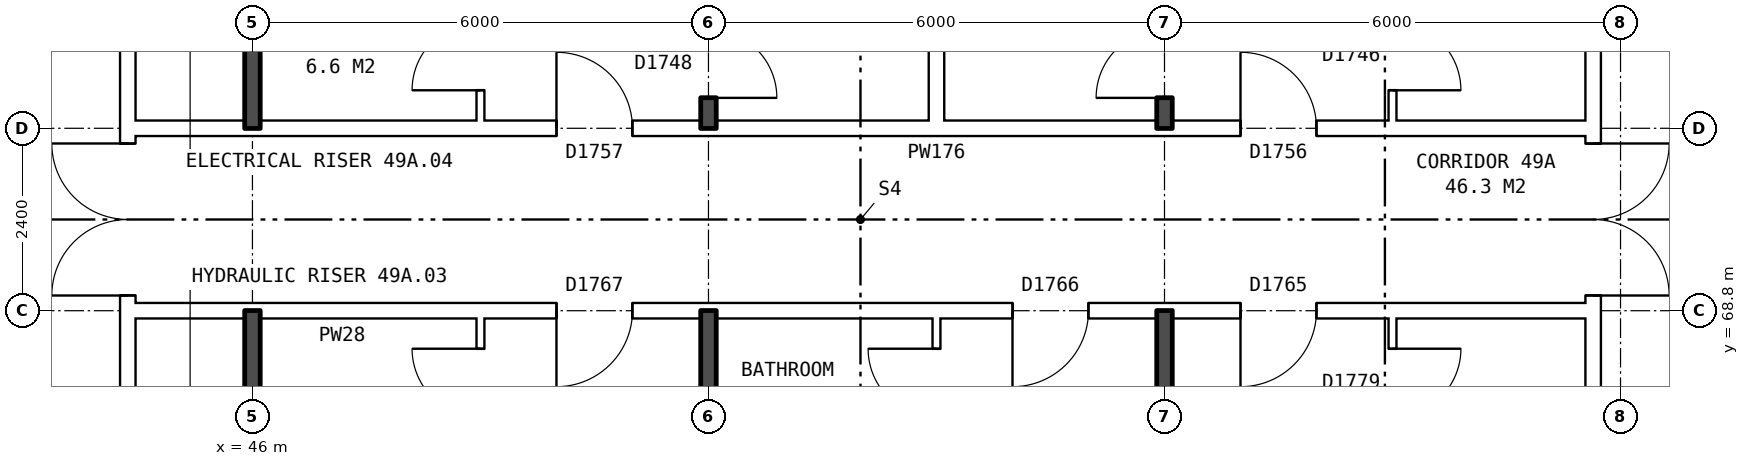
"""IFC4 building model, lengths in metres.
Left out: names, types, materials, properties, quantities, classifications, styles, units other than length and angle.
Written with IfcOpenShell. Run it as: python <this file> out.ifc"""

import sys

from ifc_helpers import new_model, si_unit, direction, frame, frame_2d, origin, place, context, subcontext, project, spatial, rectangle, extrude, element, fill, save


model = new_model("IFC4")
c1 = context("Model", 3, precision=1e-05, world=origin(), true_north=direction((0.0, 1.0)))
c2 = subcontext(c1, "Body", "Model", "MODEL_VIEW")
j1 = project(units=[si_unit("LENGTHUNIT", "METRE"), si_unit("PLANEANGLEUNIT", "RADIAN")], contexts=[c1])
p1 = place(None, origin())
s1 = spatial("IfcSite", under=j1, at=p1, CompositionType="ELEMENT")
p2 = place(p1, origin())
s2 = spatial("IfcBuilding", under=s1, at=p2, CompositionType="ELEMENT")
p3 = place(p2, frame((0.0, 0.0, 175.8)))
s3 = spatial("IfcBuildingStorey", under=s2, at=p3, CompositionType="ELEMENT", Elevation=175.8)
p4 = place(p3, frame((63.64, 63.9, 0.0), z_axis=(0.0, 0.0, 1.0), x_axis=(0.0, 1.0, 0.0)))
e1 = element("IfcWall", 1, at=p4, inside=s3, PredefinedType="PARTITIONING", context=c2, shape_type="SweptSolid", body=[
    extrude(rectangle(XDim=12.2, YDim=0.2, at=frame_2d((6.1, 0.0))), origin(), (0.0, 0.0, 1.0), 2.85),
])
p5 = place(p4, frame((5.1, 0.0, 0.0)))
e2 = element("IfcOpeningElement", 2, at=p5, cuts=e1, PredefinedType="OPENING", context=c2, shape_type="SweptSolid", body=[
    extrude(rectangle(XDim=2.0, YDim=2.1, at=frame_2d((1.0, 1.05))), frame((0.0, 0.11, 0.0), z_axis=(0.0, -1.0, 0.0), x_axis=(1.0, 0.0, 0.0)), (0.0, 0.0, 1.0), 0.22),
])
p6 = place(p3, frame((44.36, 63.9, 0.0), z_axis=(0.0, 0.0, 1.0), x_axis=(0.0, 1.0, 0.0)))
e3 = element("IfcWall", 3, at=p6, inside=s3, PredefinedType="PARTITIONING", context=c2, shape_type="SweptSolid", body=[
    extrude(rectangle(XDim=12.2, YDim=0.2, at=frame_2d((6.1, 0.0))), origin(), (0.0, 0.0, 1.0), 2.85),
])
p7 = place(p6, frame((5.1, 0.0, 0.0)))
e4 = element("IfcOpeningElement", 4, at=p7, cuts=e3, PredefinedType="OPENING", context=c2, shape_type="SweptSolid", body=[
    extrude(rectangle(XDim=2.0, YDim=2.1, at=frame_2d((1.0, 1.05))), frame((0.0, 0.11, 0.0), z_axis=(0.0, -1.0, 0.0), x_axis=(1.0, 0.0, 0.0)), (0.0, 0.0, 1.0), 0.22),
])
p8 = place(p3, frame((44.36, 68.8, 0.0), z_axis=(0.0, 0.0, 1.0), x_axis=(1.0, 0.0, 0.0)))
e5 = element("IfcWall", 5, at=p8, inside=s3, PredefinedType="PARTITIONING", context=c2, shape_type="SweptSolid", body=[
    extrude(rectangle(XDim=19.28, YDim=0.2, at=frame_2d((9.64, 0.0))), origin(), (0.0, 0.0, 1.0), 2.85),
])
p9 = place(p8, frame((14.64, 0.0, 0.0)))
e6 = element("IfcOpeningElement", 6, at=p9, cuts=e5, PredefinedType="OPENING", context=c2, shape_type="SweptSolid", body=[
    extrude(rectangle(XDim=1.0, YDim=2.1, at=frame_2d((0.5, 1.05))), frame((0.0, 0.11, 0.0), z_axis=(0.0, -1.0, 0.0), x_axis=(1.0, 0.0, 0.0)), (0.0, 0.0, 1.0), 0.22),
])
p10 = place(p8, frame((11.64, 0.0, 0.0)))
e7 = element("IfcOpeningElement", 7, at=p10, cuts=e5, PredefinedType="OPENING", context=c2, shape_type="SweptSolid", body=[
    extrude(rectangle(XDim=1.0, YDim=2.1, at=frame_2d((0.5, 1.05))), frame((0.0, 0.11, 0.0), z_axis=(0.0, -1.0, 0.0), x_axis=(1.0, 0.0, 0.0)), (0.0, 0.0, 1.0), 0.22),
])
p11 = place(p8, frame((5.64, 0.0, 0.0)))
e8 = element("IfcOpeningElement", 8, at=p11, cuts=e5, PredefinedType="OPENING", context=c2, shape_type="SweptSolid", body=[
    extrude(rectangle(XDim=1.0, YDim=2.1, at=frame_2d((0.5, 1.05))), frame((0.0, 0.11, 0.0), z_axis=(0.0, -1.0, 0.0), x_axis=(1.0, 0.0, 0.0)), (0.0, 0.0, 1.0), 0.22),
])
p12 = place(p3, frame((44.36, 71.2, 0.0), z_axis=(0.0, 0.0, 1.0), x_axis=(1.0, 0.0, 0.0)))
e9 = element("IfcWall", 9, at=p12, inside=s3, PredefinedType="PARTITIONING", context=c2, shape_type="SweptSolid", body=[
    extrude(rectangle(XDim=19.28, YDim=0.2, at=frame_2d((9.64, 0.0))), origin(), (0.0, 0.0, 1.0), 2.85),
])
p13 = place(p12, frame((14.64, 0.0, 0.0)))
e10 = element("IfcOpeningElement", 10, at=p13, cuts=e9, PredefinedType="OPENING", context=c2, shape_type="SweptSolid", body=[
    extrude(rectangle(XDim=1.0, YDim=2.1, at=frame_2d((0.5, 1.05))), frame((0.0, 0.11, 0.0), z_axis=(0.0, -1.0, 0.0), x_axis=(1.0, 0.0, 0.0)), (0.0, 0.0, 1.0), 0.22),
])
p14 = place(p12, frame((5.64, 0.0, 0.0)))
e11 = element("IfcOpeningElement", 11, at=p14, cuts=e9, PredefinedType="OPENING", context=c2, shape_type="SweptSolid", body=[
    extrude(rectangle(XDim=1.0, YDim=2.1, at=frame_2d((0.5, 1.05))), frame((0.0, 0.11, 0.0), z_axis=(0.0, -1.0, 0.0), x_axis=(1.0, 0.0, 0.0)), (0.0, 0.0, 1.0), 0.22),
])
for number, where, z_axis, x_axis in (
    (12, (46.0, 63.8, 0.0), (0.0, 0.0, 1.0), (0.0, 1.0, 0.0)),
    (13, (46.0, 71.2, 0.0), (0.0, 0.0, 1.0), (0.0, 1.0, 0.0)),
):
    element("IfcWall", number, at=place(p3, frame(where, z_axis=z_axis, x_axis=x_axis)), inside=s3, PredefinedType="SOLIDWALL", context=c2, shape_type="SweptSolid", body=[
        extrude(rectangle(XDim=5.0, YDim=0.2, at=frame_2d((2.5, 0.0))), origin(), (0.0, 0.0, 1.0), 2.85),
    ])
p15 = place(p3, frame((49.0, 54.36, 0.0), z_axis=(0.0, 0.0, 1.0), x_axis=(0.0, 1.0, 0.0)))
e14 = element("IfcWall", 14, at=p15, inside=s3, PredefinedType="PARTITIONING", context=c2, shape_type="SweptSolid", body=[
    extrude(rectangle(XDim=14.34, YDim=0.1, at=frame_2d((7.17, 0.0))), origin(), (0.0, 0.0, 1.0), 2.85),
])
p16 = place(p15, frame((6.7, 0.0, 0.0)))
e15 = element("IfcOpeningElement", 15, at=p16, cuts=e14, PredefinedType="OPENING", context=c2, shape_type="SweptSolid", body=[
    extrude(rectangle(XDim=0.9, YDim=2.1, at=frame_2d((0.45, 1.05))), frame((0.0, 0.06, 0.0), z_axis=(0.0, -1.0, 0.0), x_axis=(1.0, 0.0, 0.0)), (0.0, 0.0, 1.0), 0.12),
])
p17 = place(p15, frame((13.04, 0.0, 0.0)))
e16 = element("IfcOpeningElement", 16, at=p17, cuts=e14, PredefinedType="OPENING", context=c2, shape_type="SweptSolid", body=[
    extrude(rectangle(XDim=0.9, YDim=2.1, at=frame_2d((0.45, 1.05))), frame((0.0, 0.06, 0.0), z_axis=(0.0, -1.0, 0.0), x_axis=(1.0, 0.0, 0.0)), (0.0, 0.0, 1.0), 0.12),
])
p18 = place(p3, frame((49.0, 71.3, 0.0), z_axis=(0.0, 0.0, 1.0), x_axis=(0.0, 1.0, 0.0)))
e17 = element("IfcWall", 17, at=p18, inside=s3, PredefinedType="PARTITIONING", context=c2, shape_type="SweptSolid", body=[
    extrude(rectangle(XDim=14.34, YDim=0.1, at=frame_2d((7.17, 0.0))), origin(), (0.0, 0.0, 1.0), 2.85),
])
p19 = place(p18, frame((9.24, 0.0, 0.0)))
e18 = element("IfcOpeningElement", 18, at=p19, cuts=e17, PredefinedType="OPENING", context=c2, shape_type="SweptSolid", body=[
    extrude(rectangle(XDim=0.9, YDim=2.1, at=frame_2d((0.45, 1.05))), frame((0.0, 0.06, 0.0), z_axis=(0.0, -1.0, 0.0), x_axis=(1.0, 0.0, 0.0)), (0.0, 0.0, 1.0), 0.12),
])
p20 = place(p18, frame((0.4, 0.0, 0.0)))
e19 = element("IfcOpeningElement", 19, at=p20, cuts=e17, PredefinedType="OPENING", context=c2, shape_type="SweptSolid", body=[
    extrude(rectangle(XDim=0.9, YDim=2.1, at=frame_2d((0.45, 1.05))), frame((0.0, 0.06, 0.0), z_axis=(0.0, -1.0, 0.0), x_axis=(1.0, 0.0, 0.0)), (0.0, 0.0, 1.0), 0.12),
])
p21 = place(p3, frame((52.0, 54.36, 0.0), z_axis=(0.0, 0.0, 1.0), x_axis=(0.0, 1.0, 0.0)))
e20 = element("IfcWall", 20, at=p21, inside=s3, PredefinedType="SOLIDWALL", context=c2, shape_type="SweptSolid", body=[
    extrude(rectangle(XDim=14.44, YDim=0.2, at=frame_2d((7.22, 0.0))), origin(), (0.0, 0.0, 1.0), 2.85),
])
p22 = place(p3, frame((52.0, 71.2, 0.0), z_axis=(0.0, 0.0, 1.0), x_axis=(0.0, 1.0, 0.0)))
e21 = element("IfcWall", 21, at=p22, inside=s3, PredefinedType="SOLIDWALL", context=c2, shape_type="SweptSolid", body=[
    extrude(rectangle(XDim=14.44, YDim=0.2, at=frame_2d((7.22, 0.0))), origin(), (0.0, 0.0, 1.0), 2.85),
])
p23 = place(p22, frame((9.34, 0.0, 0.0)))
e22 = element("IfcOpeningElement", 22, at=p23, cuts=e21, PredefinedType="OPENING", context=c2, shape_type="SweptSolid", body=[
    extrude(rectangle(XDim=0.9, YDim=2.1, at=frame_2d((0.45, 1.05))), frame((0.0, 0.11, 0.0), z_axis=(0.0, -1.0, 0.0), x_axis=(1.0, 0.0, 0.0)), (0.0, 0.0, 1.0), 0.22),
])
p24 = place(p22, frame((0.4, 0.0, 0.0)))
e23 = element("IfcOpeningElement", 23, at=p24, cuts=e21, PredefinedType="OPENING", context=c2, shape_type="SweptSolid", body=[
    extrude(rectangle(XDim=0.9, YDim=2.1, at=frame_2d((0.45, 1.05))), frame((0.0, 0.11, 0.0), z_axis=(0.0, -1.0, 0.0), x_axis=(1.0, 0.0, 0.0)), (0.0, 0.0, 1.0), 0.22),
])
p25 = place(p3, frame((55.0, 54.36, 0.0), z_axis=(0.0, 0.0, 1.0), x_axis=(0.0, 1.0, 0.0)))
e24 = element("IfcWall", 24, at=p25, inside=s3, PredefinedType="PARTITIONING", context=c2, shape_type="SweptSolid", body=[
    extrude(rectangle(XDim=14.34, YDim=0.1, at=frame_2d((7.17, 0.0))), origin(), (0.0, 0.0, 1.0), 2.85),
])
p26 = place(p25, frame((4.2, 0.0, 0.0)))
e25 = element("IfcOpeningElement", 25, at=p26, cuts=e24, PredefinedType="OPENING", context=c2, shape_type="SweptSolid", body=[
    extrude(rectangle(XDim=0.9, YDim=2.1, at=frame_2d((0.45, 1.05))), frame((0.0, 0.06, 0.0), z_axis=(0.0, -1.0, 0.0), x_axis=(1.0, 0.0, 0.0)), (0.0, 0.0, 1.0), 0.12),
])
p27 = place(p25, frame((13.04, 0.0, 0.0)))
e26 = element("IfcOpeningElement", 26, at=p27, cuts=e24, PredefinedType="OPENING", context=c2, shape_type="SweptSolid", body=[
    extrude(rectangle(XDim=0.9, YDim=2.1, at=frame_2d((0.45, 1.05))), frame((0.0, 0.06, 0.0), z_axis=(0.0, -1.0, 0.0), x_axis=(1.0, 0.0, 0.0)), (0.0, 0.0, 1.0), 0.12),
])
p28 = place(p3, frame((55.0, 71.3, 0.0), z_axis=(0.0, 0.0, 1.0), x_axis=(0.0, 1.0, 0.0)))
e27 = element("IfcWall", 27, at=p28, inside=s3, PredefinedType="PARTITIONING", context=c2, shape_type="SweptSolid", body=[
    extrude(rectangle(XDim=14.34, YDim=0.2, at=frame_2d((7.17, 0.0))), origin(), (0.0, 0.0, 1.0), 2.85),
])
p29 = place(p3, frame((58.0, 54.36, 0.0), z_axis=(0.0, 0.0, 1.0), x_axis=(0.0, 1.0, 0.0)))
e28 = element("IfcWall", 28, at=p29, inside=s3, PredefinedType="SOLIDWALL", context=c2, shape_type="SweptSolid", body=[
    extrude(rectangle(XDim=14.44, YDim=0.2, at=frame_2d((7.22, 0.0))), origin(), (0.0, 0.0, 1.0), 2.85),
])
p30 = place(p3, frame((58.0, 71.2, 0.0), z_axis=(0.0, 0.0, 1.0), x_axis=(0.0, 1.0, 0.0)))
e29 = element("IfcWall", 29, at=p30, inside=s3, PredefinedType="SOLIDWALL", context=c2, shape_type="SweptSolid", body=[
    extrude(rectangle(XDim=14.44, YDim=0.2, at=frame_2d((7.22, 0.0))), origin(), (0.0, 0.0, 1.0), 2.85),
])
p31 = place(p30, frame((9.34, 0.0, 0.0)))
e30 = element("IfcOpeningElement", 30, at=p31, cuts=e29, PredefinedType="OPENING", context=c2, shape_type="SweptSolid", body=[
    extrude(rectangle(XDim=0.9, YDim=2.1, at=frame_2d((0.45, 1.05))), frame((0.0, 0.11, 0.0), z_axis=(0.0, -1.0, 0.0), x_axis=(1.0, 0.0, 0.0)), (0.0, 0.0, 1.0), 0.22),
])
p32 = place(p30, frame((0.4, 0.0, 0.0)))
e31 = element("IfcOpeningElement", 31, at=p32, cuts=e29, PredefinedType="OPENING", context=c2, shape_type="SweptSolid", body=[
    extrude(rectangle(XDim=0.9, YDim=2.1, at=frame_2d((0.45, 1.05))), frame((0.0, 0.11, 0.0), z_axis=(0.0, -1.0, 0.0), x_axis=(1.0, 0.0, 0.0)), (0.0, 0.0, 1.0), 0.22),
])
p33 = place(p3, frame((61.0, 54.36, 0.0), z_axis=(0.0, 0.0, 1.0), x_axis=(0.0, 1.0, 0.0)))
e32 = element("IfcWall", 32, at=p33, inside=s3, PredefinedType="PARTITIONING", context=c2, shape_type="SweptSolid", body=[
    extrude(rectangle(XDim=14.34, YDim=0.1, at=frame_2d((7.17, 0.0))), origin(), (0.0, 0.0, 1.0), 2.85),
])
p34 = place(p33, frame((6.7, 0.0, 0.0)))
e33 = element("IfcOpeningElement", 33, at=p34, cuts=e32, PredefinedType="OPENING", context=c2, shape_type="SweptSolid", body=[
    extrude(rectangle(XDim=0.9, YDim=2.1, at=frame_2d((0.45, 1.05))), frame((0.0, 0.06, 0.0), z_axis=(0.0, -1.0, 0.0), x_axis=(1.0, 0.0, 0.0)), (0.0, 0.0, 1.0), 0.12),
])
p35 = place(p33, frame((13.04, 0.0, 0.0)))
e34 = element("IfcOpeningElement", 34, at=p35, cuts=e32, PredefinedType="OPENING", context=c2, shape_type="SweptSolid", body=[
    extrude(rectangle(XDim=0.9, YDim=2.1, at=frame_2d((0.45, 1.05))), frame((0.0, 0.06, 0.0), z_axis=(0.0, -1.0, 0.0), x_axis=(1.0, 0.0, 0.0)), (0.0, 0.0, 1.0), 0.12),
])
p36 = place(p3, frame((61.0, 71.3, 0.0), z_axis=(0.0, 0.0, 1.0), x_axis=(0.0, 1.0, 0.0)))
e35 = element("IfcWall", 35, at=p36, inside=s3, PredefinedType="PARTITIONING", context=c2, shape_type="SweptSolid", body=[
    extrude(rectangle(XDim=14.34, YDim=0.1, at=frame_2d((7.17, 0.0))), origin(), (0.0, 0.0, 1.0), 2.85),
])
p37 = place(p36, frame((9.24, 0.0, 0.0)))
e36 = element("IfcOpeningElement", 36, at=p37, cuts=e35, PredefinedType="OPENING", context=c2, shape_type="SweptSolid", body=[
    extrude(rectangle(XDim=0.9, YDim=2.1, at=frame_2d((0.45, 1.05))), frame((0.0, 0.06, 0.0), z_axis=(0.0, -1.0, 0.0), x_axis=(1.0, 0.0, 0.0)), (0.0, 0.0, 1.0), 0.12),
])
p38 = place(p36, frame((0.4, 0.0, 0.0)))
e37 = element("IfcOpeningElement", 37, at=p38, cuts=e35, PredefinedType="OPENING", context=c2, shape_type="SweptSolid", body=[
    extrude(rectangle(XDim=0.9, YDim=2.1, at=frame_2d((0.45, 1.05))), frame((0.0, 0.06, 0.0), z_axis=(0.0, -1.0, 0.0), x_axis=(1.0, 0.0, 0.0)), (0.0, 0.0, 1.0), 0.12),
])
p39 = place(p5, frame((2.0, 0.0, 0.0), z_axis=(0.0, 0.0, 1.0), x_axis=(-1.0, 0.0, 0.0)))
e38 = element("IfcDoor", 38, at=p39, inside=s3, OperationType="DOUBLE_DOOR_SINGLE_SWING", PredefinedType="DOOR", context=c2, shape_type="SweptSolid", body=[
    extrude(rectangle(XDim=2.0, YDim=2.1, at=frame_2d((1.0, 1.05))), frame((0.0, 0.025, 0.0), z_axis=(0.0, -1.0, 0.0), x_axis=(1.0, 0.0, 0.0)), (0.0, 0.0, 1.0), 0.05),
])
fill(e2, e38)
p40 = place(p7, origin())
e39 = element("IfcDoor", 39, at=p40, inside=s3, OperationType="DOUBLE_DOOR_SINGLE_SWING", PredefinedType="DOOR", context=c2, shape_type="SweptSolid", body=[
    extrude(rectangle(XDim=2.0, YDim=2.1, at=frame_2d((1.0, 1.05))), frame((0.0, 0.025, 0.0), z_axis=(0.0, -1.0, 0.0), x_axis=(1.0, 0.0, 0.0)), (0.0, 0.0, 1.0), 0.05),
])
fill(e4, e39)
p41 = place(p9, frame((1.0, 0.0, 0.0), z_axis=(0.0, 0.0, 1.0), x_axis=(-1.0, 0.0, 0.0)))
e40 = element("IfcDoor", 40, at=p41, inside=s3, OperationType="SINGLE_SWING_RIGHT", PredefinedType="DOOR", context=c2, shape_type="SweptSolid", body=[
    extrude(rectangle(XDim=1.0, YDim=2.1, at=frame_2d((0.5, 1.05))), frame((0.0, 0.025, 0.0), z_axis=(0.0, -1.0, 0.0), x_axis=(1.0, 0.0, 0.0)), (0.0, 0.0, 1.0), 0.05),
])
fill(e6, e40)
p42 = place(p35, frame((0.9, 0.0, 0.0), z_axis=(0.0, 0.0, 1.0), x_axis=(-1.0, 0.0, 0.0)))
e41 = element("IfcDoor", 41, at=p42, inside=s3, OperationType="SINGLE_SWING_LEFT", PredefinedType="DOOR", context=c2, shape_type="SweptSolid", body=[
    extrude(rectangle(XDim=0.9, YDim=2.1, at=frame_2d((0.45, 1.05))), frame((0.0, 0.025, 0.0), z_axis=(0.0, -1.0, 0.0), x_axis=(1.0, 0.0, 0.0)), (0.0, 0.0, 1.0), 0.05),
])
fill(e34, e41)
p43 = place(p10, frame((1.0, 0.0, 0.0), z_axis=(0.0, 0.0, 1.0), x_axis=(-1.0, 0.0, 0.0)))
e42 = element("IfcDoor", 42, at=p43, inside=s3, OperationType="SINGLE_SWING_RIGHT", PredefinedType="DOOR", context=c2, shape_type="SweptSolid", body=[
    extrude(rectangle(XDim=1.0, YDim=2.1, at=frame_2d((0.5, 1.05))), frame((0.0, 0.025, 0.0), z_axis=(0.0, -1.0, 0.0), x_axis=(1.0, 0.0, 0.0)), (0.0, 0.0, 1.0), 0.05),
])
fill(e7, e42)
p44 = place(p27, origin())
e43 = element("IfcDoor", 43, at=p44, inside=s3, OperationType="SINGLE_SWING_RIGHT", PredefinedType="DOOR", context=c2, shape_type="SweptSolid", body=[
    extrude(rectangle(XDim=0.9, YDim=2.1, at=frame_2d((0.45, 1.05))), frame((0.0, 0.025, 0.0), z_axis=(0.0, -1.0, 0.0), x_axis=(1.0, 0.0, 0.0)), (0.0, 0.0, 1.0), 0.05),
])
fill(e26, e43)
p45 = place(p11, frame((1.0, 0.0, 0.0), z_axis=(0.0, 0.0, 1.0), x_axis=(-1.0, 0.0, 0.0)))
e44 = element("IfcDoor", 44, at=p45, inside=s3, OperationType="SINGLE_SWING_RIGHT", PredefinedType="DOOR", context=c2, shape_type="SweptSolid", body=[
    extrude(rectangle(XDim=1.0, YDim=2.1, at=frame_2d((0.5, 1.05))), frame((0.0, 0.025, 0.0), z_axis=(0.0, -1.0, 0.0), x_axis=(1.0, 0.0, 0.0)), (0.0, 0.0, 1.0), 0.05),
])
fill(e8, e44)
p46 = place(p17, origin())
e45 = element("IfcDoor", 45, at=p46, inside=s3, OperationType="SINGLE_SWING_RIGHT", PredefinedType="DOOR", context=c2, shape_type="SweptSolid", body=[
    extrude(rectangle(XDim=0.9, YDim=2.1, at=frame_2d((0.45, 1.05))), frame((0.0, 0.025, 0.0), z_axis=(0.0, -1.0, 0.0), x_axis=(1.0, 0.0, 0.0)), (0.0, 0.0, 1.0), 0.05),
])
fill(e16, e45)
p47 = place(p13, origin())
e46 = element("IfcDoor", 46, at=p47, inside=s3, OperationType="SINGLE_SWING_LEFT", PredefinedType="DOOR", context=c2, shape_type="SweptSolid", body=[
    extrude(rectangle(XDim=1.0, YDim=2.1, at=frame_2d((0.5, 1.05))), frame((0.0, 0.025, 0.0), z_axis=(0.0, -1.0, 0.0), x_axis=(1.0, 0.0, 0.0)), (0.0, 0.0, 1.0), 0.05),
])
fill(e10, e46)
p48 = place(p38, frame((0.9, 0.0, 0.0), z_axis=(0.0, 0.0, 1.0), x_axis=(-1.0, 0.0, 0.0)))
e47 = element("IfcDoor", 47, at=p48, inside=s3, OperationType="SINGLE_SWING_RIGHT", PredefinedType="DOOR", context=c2, shape_type="SweptSolid", body=[
    extrude(rectangle(XDim=0.9, YDim=2.1, at=frame_2d((0.45, 1.05))), frame((0.0, 0.025, 0.0), z_axis=(0.0, -1.0, 0.0), x_axis=(1.0, 0.0, 0.0)), (0.0, 0.0, 1.0), 0.05),
])
fill(e37, e47)
p49 = place(p32, origin())
e48 = element("IfcDoor", 48, at=p49, inside=s3, OperationType="SINGLE_SWING_LEFT", PredefinedType="DOOR", context=c2, shape_type="SweptSolid", body=[
    extrude(rectangle(XDim=0.9, YDim=2.1, at=frame_2d((0.45, 1.05))), frame((0.0, 0.025, 0.0), z_axis=(0.0, -1.0, 0.0), x_axis=(1.0, 0.0, 0.0)), (0.0, 0.0, 1.0), 0.05),
])
fill(e31, e48)
p50 = place(p14, origin())
e49 = element("IfcDoor", 49, at=p50, inside=s3, OperationType="SINGLE_SWING_LEFT", PredefinedType="DOOR", context=c2, shape_type="SweptSolid", body=[
    extrude(rectangle(XDim=1.0, YDim=2.1, at=frame_2d((0.5, 1.05))), frame((0.0, 0.025, 0.0), z_axis=(0.0, -1.0, 0.0), x_axis=(1.0, 0.0, 0.0)), (0.0, 0.0, 1.0), 0.05),
])
fill(e11, e49)
p51 = place(p24, frame((0.9, 0.0, 0.0), z_axis=(0.0, 0.0, 1.0), x_axis=(-1.0, 0.0, 0.0)))
e50 = element("IfcDoor", 50, at=p51, inside=s3, OperationType="SINGLE_SWING_RIGHT", PredefinedType="DOOR", context=c2, shape_type="SweptSolid", body=[
    extrude(rectangle(XDim=0.9, YDim=2.1, at=frame_2d((0.45, 1.05))), frame((0.0, 0.025, 0.0), z_axis=(0.0, -1.0, 0.0), x_axis=(1.0, 0.0, 0.0)), (0.0, 0.0, 1.0), 0.05),
])
fill(e23, e50)
p52 = place(p20, origin())
e51 = element("IfcDoor", 51, at=p52, inside=s3, OperationType="SINGLE_SWING_LEFT", PredefinedType="DOOR", context=c2, shape_type="SweptSolid", body=[
    extrude(rectangle(XDim=0.9, YDim=2.1, at=frame_2d((0.45, 1.05))), frame((0.0, 0.025, 0.0), z_axis=(0.0, -1.0, 0.0), x_axis=(1.0, 0.0, 0.0)), (0.0, 0.0, 1.0), 0.05),
])
fill(e19, e51)
save(model, sys.argv[1])
